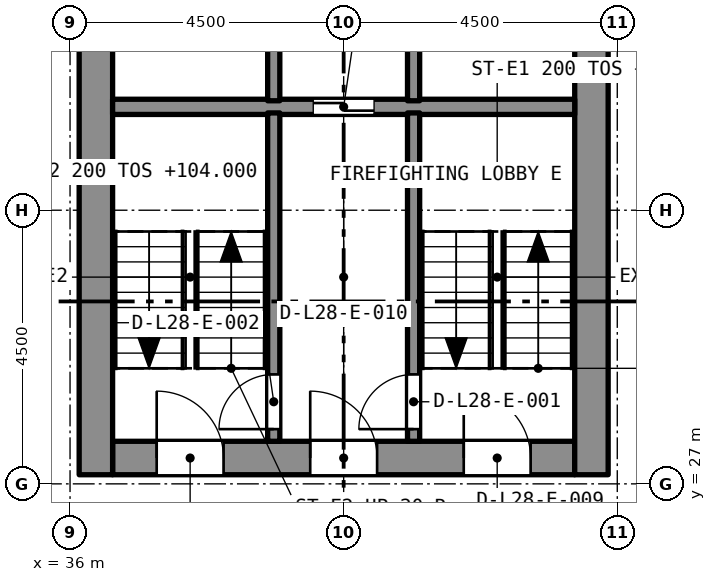
"""IFC4 building model, lengths in metres.
Left out: names, types, materials, properties, quantities, classifications, styles, units other than length and angle.
Written with IfcOpenShell. Run it as: python <this file> out.ifc"""

import sys

from ifc_helpers import new_model, si_unit, direction, frame, frame_2d, origin, place, context, subcontext, project, spatial, rectangle, extrude, element, fill, save


model = new_model("IFC4")
c1 = context("Model", 3, precision=1e-05, world=origin(), true_north=direction((0.0, 1.0)))
c2 = subcontext(c1, "Body", "Model", "MODEL_VIEW")
j1 = project(units=[si_unit("LENGTHUNIT", "METRE"), si_unit("PLANEANGLEUNIT", "RADIAN")], contexts=[c1])
p1 = place(None, origin())
s1 = spatial("IfcSite", under=j1, at=p1, CompositionType="ELEMENT")
p2 = place(p1, origin())
s2 = spatial("IfcBuilding", under=s1, at=p2, CompositionType="ELEMENT")
p3 = place(p2, frame((0.0, 0.0, 102.4)))
s3 = spatial("IfcBuildingStorey", under=s2, at=p3, CompositionType="ELEMENT", Elevation=102.4)
p4 = place(p3, frame((36.7, 27.425, 0.0), z_axis=(0.0, 0.0, 1.0), x_axis=(1.0, 0.0, 0.0)))
e1 = element("IfcWall", 1, at=p4, inside=s3, PredefinedType="SOLIDWALL", context=c2, shape_type="SweptSolid", body=[
    extrude(rectangle(XDim=7.6, YDim=0.55, at=frame_2d((3.8, 0.0))), origin(), (0.0, 0.0, 1.0), 3.2),
])
p5 = place(p4, frame((5.775, 0.0, 0.0)))
e2 = element("IfcOpeningElement", 2, at=p5, cuts=e1, PredefinedType="OPENING", context=c2, shape_type="SweptSolid", body=[
    extrude(rectangle(XDim=1.1, YDim=2.1, at=frame_2d((0.55, 1.05))), frame((0.0, 0.285, 0.0), z_axis=(0.0, -1.0, 0.0), x_axis=(1.0, 0.0, 0.0)), (0.0, 0.0, 1.0), 0.57),
])
p6 = place(p4, frame((3.25, 0.0, 0.0)))
e3 = element("IfcOpeningElement", 3, at=p6, cuts=e1, PredefinedType="OPENING", context=c2, shape_type="SweptSolid", body=[
    extrude(rectangle(XDim=1.1, YDim=2.1, at=frame_2d((0.55, 1.05))), frame((0.0, 0.285, 0.0), z_axis=(0.0, -1.0, 0.0), x_axis=(1.0, 0.0, 0.0)), (0.0, 0.0, 1.0), 0.57),
])
p7 = place(p4, frame((0.725, 0.0, 0.0)))
e4 = element("IfcOpeningElement", 4, at=p7, cuts=e1, PredefinedType="OPENING", context=c2, shape_type="SweptSolid", body=[
    extrude(rectangle(XDim=1.1, YDim=2.1, at=frame_2d((0.55, 1.05))), frame((0.0, 0.285, 0.0), z_axis=(0.0, -1.0, 0.0), x_axis=(1.0, 0.0, 0.0)), (0.0, 0.0, 1.0), 0.57),
])
p8 = place(p3, frame((36.425, 27.15, 0.0), z_axis=(0.0, 0.0, 1.0), x_axis=(0.0, 1.0, 0.0)))
e5 = element("IfcWall", 5, at=p8, inside=s3, PredefinedType="SOLIDWALL", context=c2, shape_type="SweptSolid", body=[
    extrude(rectangle(XDim=13.2, YDim=0.55, at=frame_2d((6.6, 0.0))), origin(), (0.0, 0.0, 1.0), 3.2),
])
p9 = place(p8, frame((8.8, 0.0, 0.0)))
e6 = element("IfcOpeningElement", 6, at=p9, cuts=e5, PredefinedType="OPENING", context=c2, shape_type="SweptSolid", body=[
    extrude(rectangle(XDim=1.2, YDim=2.1, at=frame_2d((0.6, 1.05))), frame((0.0, 0.285, 0.0), z_axis=(0.0, -1.0, 0.0), x_axis=(1.0, 0.0, 0.0)), (0.0, 0.0, 1.0), 0.57),
])
p10 = place(p3, frame((44.575, 27.15, 0.0), z_axis=(0.0, 0.0, 1.0), x_axis=(0.0, 1.0, 0.0)))
e7 = element("IfcWall", 7, at=p10, inside=s3, PredefinedType="SOLIDWALL", context=c2, shape_type="SweptSolid", body=[
    extrude(rectangle(XDim=13.2, YDim=0.55, at=frame_2d((6.6, 0.0))), origin(), (0.0, 0.0, 1.0), 3.2),
])
p11 = place(p10, frame((8.8, 0.0, 0.0)))
e8 = element("IfcOpeningElement", 8, at=p11, cuts=e7, PredefinedType="OPENING", context=c2, shape_type="SweptSolid", body=[
    extrude(rectangle(XDim=1.2, YDim=2.1, at=frame_2d((0.6, 1.05))), frame((0.0, 0.285, 0.0), z_axis=(0.0, -1.0, 0.0), x_axis=(1.0, 0.0, 0.0)), (0.0, 0.0, 1.0), 0.57),
])
p12 = place(p3, frame((36.7, 33.2, 0.0), z_axis=(0.0, 0.0, 1.0), x_axis=(1.0, 0.0, 0.0)))
e9 = element("IfcWall", 9, at=p12, inside=s3, PredefinedType="SOLIDWALL", context=c2, shape_type="SweptSolid", body=[
    extrude(rectangle(XDim=7.6, YDim=0.25, at=frame_2d((3.8, 0.0))), origin(), (0.0, 0.0, 1.0), 2.9),
])
p13 = place(p12, frame((3.3, 0.0, 0.0)))
e10 = element("IfcOpeningElement", 10, at=p13, cuts=e9, PredefinedType="OPENING", context=c2, shape_type="SweptSolid", body=[
    extrude(rectangle(XDim=1.0, YDim=2.1, at=frame_2d((0.5, 1.05))), frame((0.0, 0.135, 0.0), z_axis=(0.0, -1.0, 0.0), x_axis=(1.0, 0.0, 0.0)), (0.0, 0.0, 1.0), 0.27),
])
p14 = place(p3, frame((41.65, 27.7, 0.0), z_axis=(0.0, 0.0, 1.0), x_axis=(0.0, 1.0, 0.0)))
e11 = element("IfcWall", 11, at=p14, inside=s3, PredefinedType="SOLIDWALL", context=c2, shape_type="SweptSolid", body=[
    extrude(rectangle(XDim=5.4, YDim=0.2, at=frame_2d((2.7, 0.0))), origin(), (0.0, 0.0, 1.0), 2.9),
])
p15 = place(p14, frame((0.2, 0.0, 0.0)))
e12 = element("IfcOpeningElement", 12, at=p15, cuts=e11, PredefinedType="OPENING", context=c2, shape_type="SweptSolid", body=[
    extrude(rectangle(XDim=0.9, YDim=2.1, at=frame_2d((0.45, 1.05))), frame((0.0, 0.11, 0.0), z_axis=(0.0, -1.0, 0.0), x_axis=(1.0, 0.0, 0.0)), (0.0, 0.0, 1.0), 0.22),
])
p16 = place(p3, frame((39.35, 27.7, 0.0), z_axis=(0.0, 0.0, 1.0), x_axis=(0.0, 1.0, 0.0)))
e13 = element("IfcWall", 13, at=p16, inside=s3, PredefinedType="SOLIDWALL", context=c2, shape_type="SweptSolid", body=[
    extrude(rectangle(XDim=5.4, YDim=0.2, at=frame_2d((2.7, 0.0))), origin(), (0.0, 0.0, 1.0), 2.9),
])
p17 = place(p16, frame((0.2, 0.0, 0.0)))
e14 = element("IfcOpeningElement", 14, at=p17, cuts=e13, PredefinedType="OPENING", context=c2, shape_type="SweptSolid", body=[
    extrude(rectangle(XDim=0.9, YDim=2.1, at=frame_2d((0.45, 1.05))), frame((0.0, 0.11, 0.0), z_axis=(0.0, -1.0, 0.0), x_axis=(1.0, 0.0, 0.0)), (0.0, 0.0, 1.0), 0.22),
])
for number, where, z_axis, x_axis in (
    (15, (41.65, 33.3, 0.0), (0.0, 0.0, 1.0), (0.0, 1.0, 0.0)),
    (16, (39.35, 33.3, 0.0), (0.0, 0.0, 1.0), (0.0, 1.0, 0.0)),
):
    element("IfcWall", number, at=place(p3, frame(where, z_axis=z_axis, x_axis=x_axis)), inside=s3, PredefinedType="SOLIDWALL", context=c2, shape_type="SweptSolid", body=[
        extrude(rectangle(XDim=2.3, YDim=0.2, at=frame_2d((1.15, 0.0))), origin(), (0.0, 0.0, 1.0), 2.9),
    ])
p18 = place(p15, origin())
e17 = element("IfcDoor", 17, at=p18, inside=s3, OperationType="SINGLE_SWING_LEFT", PredefinedType="DOOR", context=c2, shape_type="SweptSolid", body=[
    extrude(rectangle(XDim=0.9, YDim=2.1, at=frame_2d((0.45, 1.05))), frame((0.0, 0.025, 0.0), z_axis=(0.0, -1.0, 0.0), x_axis=(1.0, 0.0, 0.0)), (0.0, 0.0, 1.0), 0.05),
])
fill(e12, e17)
p19 = place(p17, origin())
e18 = element("IfcDoor", 18, at=p19, inside=s3, OperationType="SINGLE_SWING_LEFT", PredefinedType="DOOR", context=c2, shape_type="SweptSolid", body=[
    extrude(rectangle(XDim=0.9, YDim=2.1, at=frame_2d((0.45, 1.05))), frame((0.0, 0.025, 0.0), z_axis=(0.0, -1.0, 0.0), x_axis=(1.0, 0.0, 0.0)), (0.0, 0.0, 1.0), 0.05),
])
fill(e14, e18)
p20 = place(p13, origin())
e19 = element("IfcDoor", 19, at=p20, inside=s3, OperationType="SLIDING_TO_LEFT", PredefinedType="DOOR", context=c2, shape_type="SweptSolid", body=[
    extrude(rectangle(XDim=1.0, YDim=2.1, at=frame_2d((0.5, 1.05))), frame((0.0, 0.025, 0.0), z_axis=(0.0, -1.0, 0.0), x_axis=(1.0, 0.0, 0.0)), (0.0, 0.0, 1.0), 0.05),
])
fill(e10, e19)
p21 = place(p5, origin())
e20 = element("IfcDoor", 20, at=p21, inside=s3, OperationType="SINGLE_SWING_LEFT", PredefinedType="DOOR", context=c2, shape_type="SweptSolid", body=[
    extrude(rectangle(XDim=1.1, YDim=2.1, at=frame_2d((0.55, 1.05))), frame((0.0, 0.025, 0.0), z_axis=(0.0, -1.0, 0.0), x_axis=(1.0, 0.0, 0.0)), (0.0, 0.0, 1.0), 0.05),
])
fill(e2, e20)
p22 = place(p6, origin())
e21 = element("IfcDoor", 21, at=p22, inside=s3, OperationType="SINGLE_SWING_LEFT", PredefinedType="DOOR", context=c2, shape_type="SweptSolid", body=[
    extrude(rectangle(XDim=1.1, YDim=2.1, at=frame_2d((0.55, 1.05))), frame((0.0, 0.025, 0.0), z_axis=(0.0, -1.0, 0.0), x_axis=(1.0, 0.0, 0.0)), (0.0, 0.0, 1.0), 0.05),
])
fill(e3, e21)
p23 = place(p7, origin())
e22 = element("IfcDoor", 22, at=p23, inside=s3, OperationType="SINGLE_SWING_LEFT", PredefinedType="DOOR", context=c2, shape_type="SweptSolid", body=[
    extrude(rectangle(XDim=1.1, YDim=2.1, at=frame_2d((0.55, 1.05))), frame((0.0, 0.025, 0.0), z_axis=(0.0, -1.0, 0.0), x_axis=(1.0, 0.0, 0.0)), (0.0, 0.0, 1.0), 0.05),
])
fill(e4, e22)
save(model, sys.argv[1])
